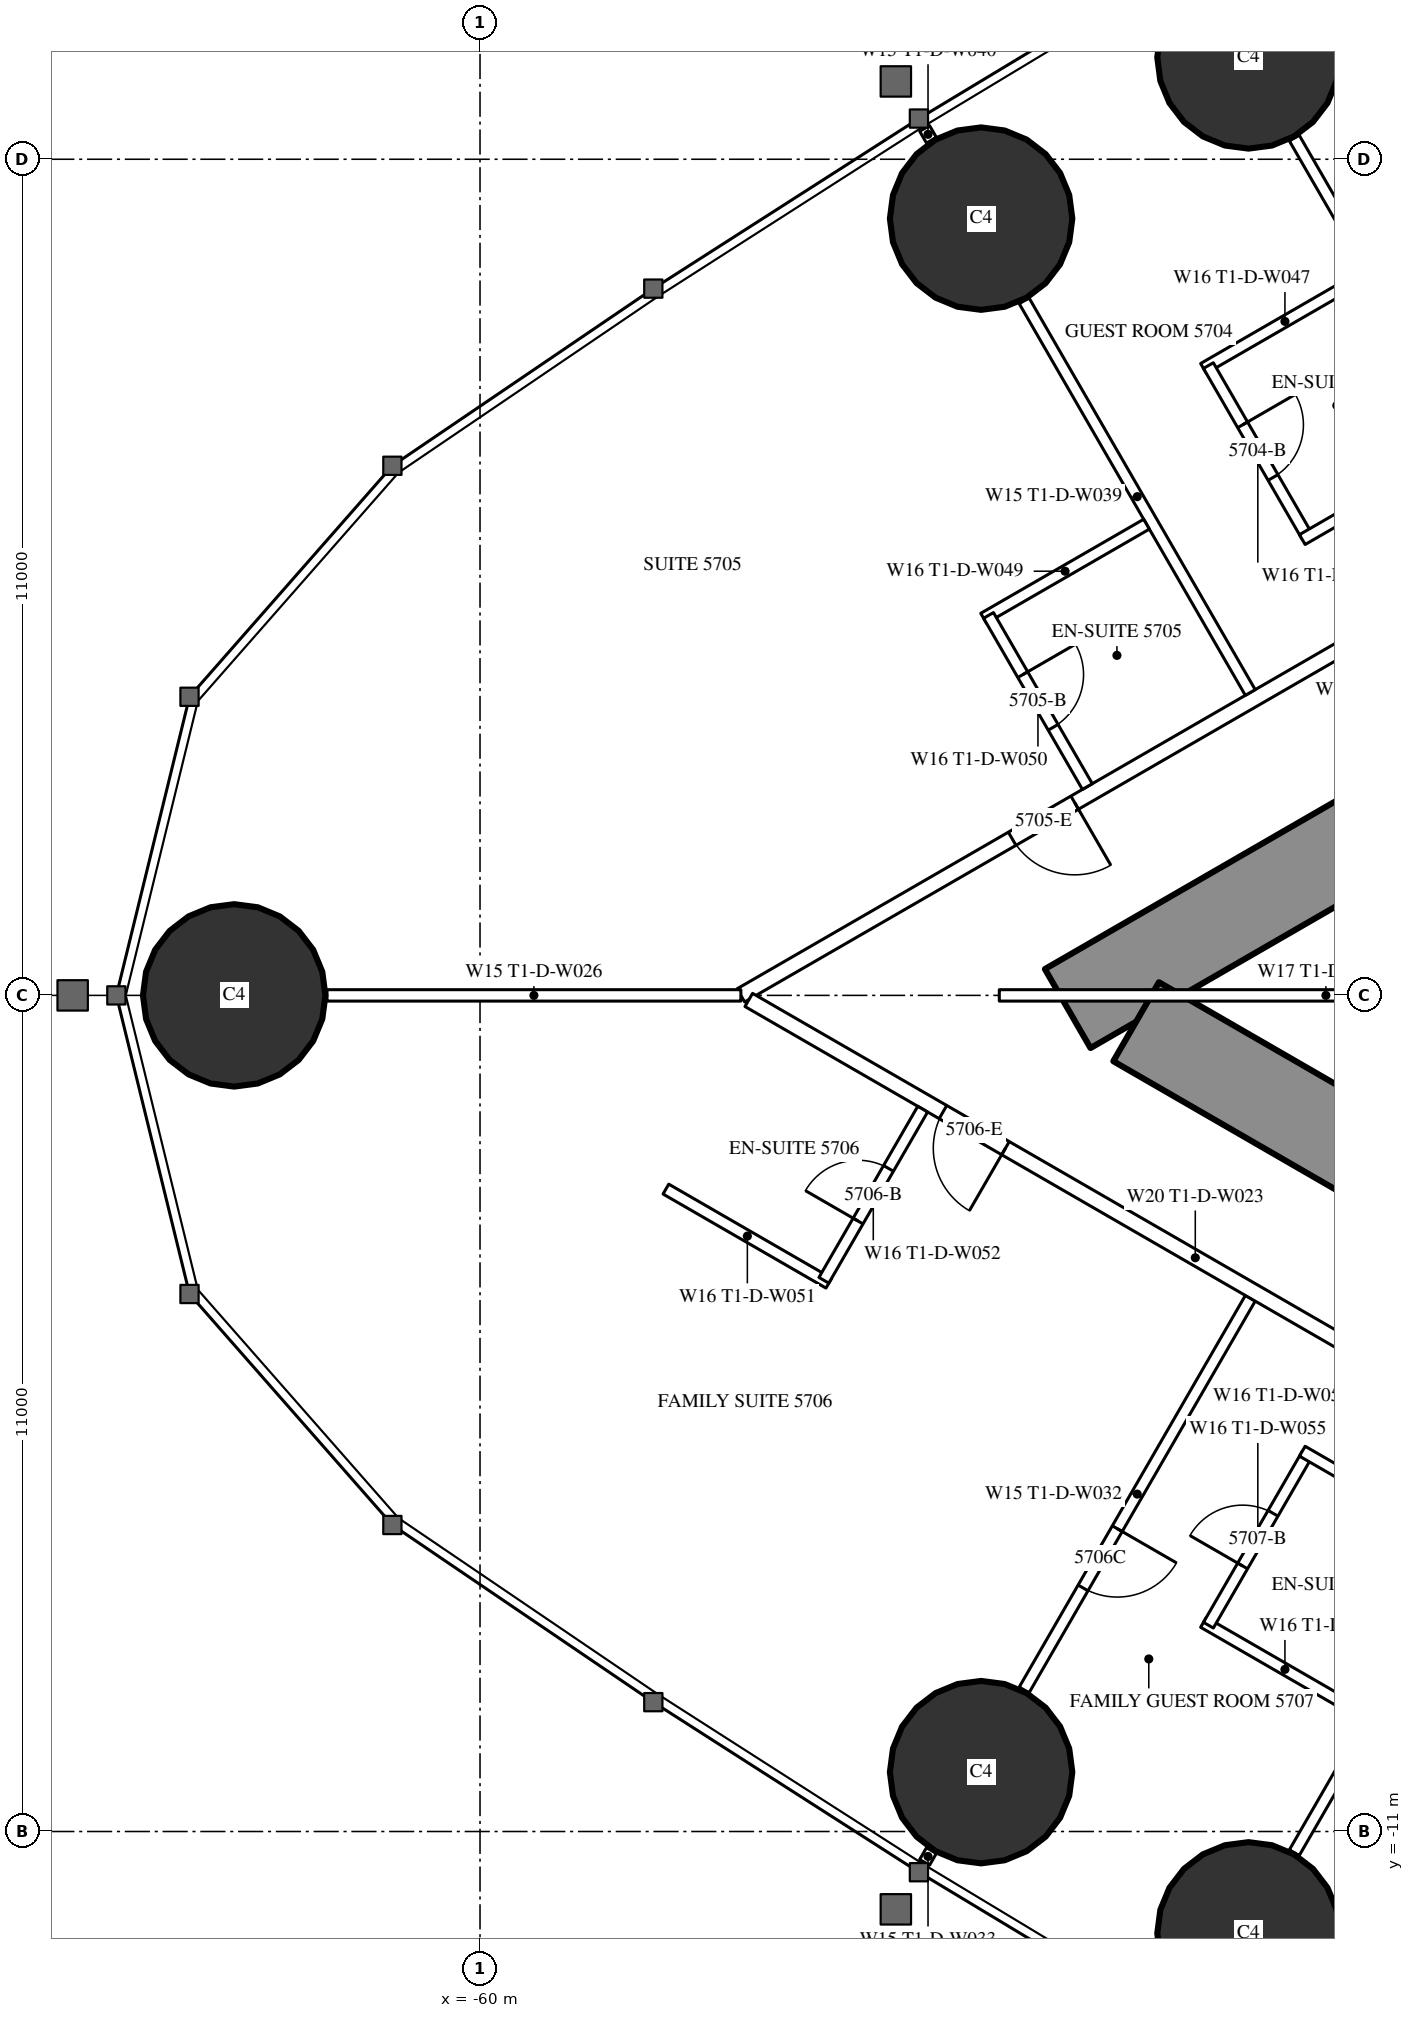
"""IFC4 building model, lengths in metres.
Left out: names, types, materials, properties, quantities, classifications, styles, units other than length and angle.
Written with IfcOpenShell. Run it as: python <this file> out.ifc"""

import sys

from ifc_helpers import new_model, si_unit, direction, frame, frame_2d, origin, origin_2d, place, context, subcontext, project, spatial, rectangle, circle, extrude, element, fill, save


model = new_model("IFC4")
c1 = context("Model", 3, precision=1e-05, world=origin(), true_north=direction((0.0, 1.0)))
c2 = subcontext(c1, "Body", "Model", "MODEL_VIEW")
j1 = project(units=[si_unit("LENGTHUNIT", "METRE"), si_unit("PLANEANGLEUNIT", "RADIAN")], contexts=[c1])
p1 = place(None, origin())
s1 = spatial("IfcSite", under=j1, at=p1, CompositionType="ELEMENT")
p2 = place(p1, origin())
s2 = spatial("IfcBuilding", under=s1, at=p2, CompositionType="ELEMENT")
p3 = place(p2, frame((0.0, 0.0, 215.3)))
s3 = spatial("IfcBuildingStorey", under=s2, at=p3, CompositionType="ELEMENT", Elevation=215.3)
for number, where, z_axis, x_axis in (
    (1, (-63.234, 0.0, 0.0), (0.0, 0.0, 1.0), (1.0, 0.0, 0.0)),
    (2, (-53.408, -10.219, 0.0), (0.0, 0.0, 1.0), (1.0, 0.0, 0.0)),
    (3, (-49.89, -12.34, 0.0), (0.0, 0.0, 1.0), (1.0, 0.0, 0.0)),
    (4, (-49.89, 12.34, 0.0), (0.0, 0.0, 1.0), (1.0, 0.0, 0.0)),
    (5, (-53.408, 10.219, 0.0), (0.0, 0.0, 1.0), (1.0, 0.0, 0.0)),
):
    element("IfcColumn", number, at=place(p3, frame(where, z_axis=z_axis, x_axis=x_axis)), inside=s3, PredefinedType="COLUMN", context=c2, shape_type="SweptSolid", body=[
        extrude(circle(Radius=1.2, at=origin_2d()), origin(), (0.0, 0.0, 1.0), 3.6),
    ])
p4 = place(p3, frame((-27.2, 14.3, 0.0), z_axis=(0.0, 0.0, 1.0), x_axis=(-0.866026593062, -0.499997940104, 0.0)))
e6 = element("IfcWall", 6, at=p4, inside=s3, PredefinedType="SHEAR", context=c2, shape_type="SweptSolid", body=[
    extrude(rectangle(XDim=28.946, YDim=1.2, at=frame_2d((14.473, 0.0))), origin(), (0.0, 0.0, 1.0), 3.6),
])
p5 = place(p4, frame((4.6, 0.0, 0.0)))
e7 = element("IfcOpeningElement", 7, at=p5, cuts=e6, PredefinedType="OPENING", context=c2, shape_type="SweptSolid", body=[
    extrude(rectangle(XDim=1.0, YDim=2.2, at=frame_2d((0.5, 1.1))), frame((0.0, 0.61, 0.0), z_axis=(0.0, -1.0, 0.0), x_axis=(1.0, 0.0, 0.0)), (0.0, 0.0, 1.0), 1.22),
])
p6 = place(p4, frame((13.395, 0.0, 0.0)))
e8 = element("IfcOpeningElement", 8, at=p6, cuts=e6, PredefinedType="OPENING", context=c2, shape_type="SweptSolid", body=[
    extrude(rectangle(XDim=1.8, YDim=2.2, at=frame_2d((0.9, 1.1))), frame((0.0, 0.61, 0.0), z_axis=(0.0, -1.0, 0.0), x_axis=(1.0, 0.0, 0.0)), (0.0, 0.0, 1.0), 1.22),
])
p7 = place(p3, frame((-27.2, -14.3, 0.0), z_axis=(0.0, 0.0, 1.0), x_axis=(-0.866024021859, 0.500002393557, 0.0)))
e9 = element("IfcWall", 9, at=p7, inside=s3, PredefinedType="SHEAR", context=c2, shape_type="SweptSolid", body=[
    extrude(rectangle(XDim=27.907, YDim=1.2, at=frame_2d((13.954, 0.0))), origin(), (0.0, 0.0, 1.0), 3.6),
])
p8 = place(p7, frame((4.6, 0.0, 0.0)))
e10 = element("IfcOpeningElement", 10, at=p8, cuts=e9, PredefinedType="OPENING", context=c2, shape_type="SweptSolid", body=[
    extrude(rectangle(XDim=1.0, YDim=2.2, at=frame_2d((0.5, 1.1))), frame((0.0, 0.61, 0.0), z_axis=(0.0, -1.0, 0.0), x_axis=(1.0, 0.0, 0.0)), (0.0, 0.0, 1.0), 1.22),
])
p9 = place(p7, frame((13.395, 0.0, 0.0)))
e11 = element("IfcOpeningElement", 11, at=p9, cuts=e9, PredefinedType="OPENING", context=c2, shape_type="SweptSolid", body=[
    extrude(rectangle(XDim=1.8, YDim=2.2, at=frame_2d((0.9, 1.1))), frame((0.0, 0.61, 0.0), z_axis=(0.0, -1.0, 0.0), x_axis=(1.0, 0.0, 0.0)), (0.0, 0.0, 1.0), 1.22),
])
p10 = place(p3, frame((-28.737, 16.068, 0.0), z_axis=(0.0, 0.0, 1.0), x_axis=(-0.866026057212, -0.499998868229, 0.0)))
e12 = element("IfcWall", 12, at=p10, inside=s3, PredefinedType="PARTITIONING", context=c2, shape_type="SweptSolid", body=[
    extrude(rectangle(XDim=32.137, YDim=0.2, at=frame_2d((16.068, 0.0))), origin(), (0.0, 0.0, 1.0), 3.35),
])
p11 = place(p10, frame((1.08, 0.0, 0.0)))
e13 = element("IfcOpeningElement", 13, at=p11, cuts=e12, PredefinedType="OPENING", context=c2, shape_type="SweptSolid", body=[
    extrude(rectangle(XDim=1.8, YDim=2.03, at=frame_2d((0.9, 1.015))), frame((0.0, 0.11, 0.0), z_axis=(0.0, -1.0, 0.0), x_axis=(1.0, 0.0, 0.0)), (0.0, 0.0, 1.0), 0.22),
])
p12 = place(p10, frame((6.86, 0.0, 0.0)))
e14 = element("IfcOpeningElement", 14, at=p12, cuts=e12, PredefinedType="OPENING", context=c2, shape_type="SweptSolid", body=[
    extrude(rectangle(XDim=1.0, YDim=2.2, at=frame_2d((0.5, 1.1))), frame((0.0, 0.11, 0.0), z_axis=(0.0, -1.0, 0.0), x_axis=(1.0, 0.0, 0.0)), (0.0, 0.0, 1.0), 0.22),
])
p13 = place(p10, frame((16.418, 0.0, 0.0)))
e15 = element("IfcOpeningElement", 15, at=p13, cuts=e12, PredefinedType="OPENING", context=c2, shape_type="SweptSolid", body=[
    extrude(rectangle(XDim=0.95, YDim=2.2, at=frame_2d((0.475, 1.1))), frame((0.0, 0.11, 0.0), z_axis=(0.0, -1.0, 0.0), x_axis=(1.0, 0.0, 0.0)), (0.0, 0.0, 1.0), 0.22),
])
p14 = place(p10, frame((20.567, 0.0, 0.0)))
e16 = element("IfcOpeningElement", 16, at=p14, cuts=e12, PredefinedType="OPENING", context=c2, shape_type="SweptSolid", body=[
    extrude(rectangle(XDim=0.95, YDim=2.2, at=frame_2d((0.475, 1.1))), frame((0.0, 0.11, 0.0), z_axis=(0.0, -1.0, 0.0), x_axis=(1.0, 0.0, 0.0)), (0.0, 0.0, 1.0), 0.22),
])
p15 = place(p10, frame((27.065, 0.0, 0.0)))
e17 = element("IfcOpeningElement", 17, at=p15, cuts=e12, PredefinedType="OPENING", context=c2, shape_type="SweptSolid", body=[
    extrude(rectangle(XDim=0.95, YDim=2.2, at=frame_2d((0.475, 1.1))), frame((0.0, 0.11, 0.0), z_axis=(0.0, -1.0, 0.0), x_axis=(1.0, 0.0, 0.0)), (0.0, 0.0, 1.0), 0.22),
])
p16 = place(p3, frame((-46.274, 6.059, 0.0), z_axis=(0.0, 0.0, 1.0), x_axis=(-0.500020471368, 0.866013584312, 0.0)))
e18 = element("IfcWall", 18, at=p16, inside=s3, PredefinedType="PARTITIONING", context=c2, shape_type="SweptSolid", body=[
    extrude(rectangle(XDim=6.028, YDim=0.15, at=frame_2d((3.014, 0.0))), origin(), (0.0, 0.0, 1.0), 2.45),
])
p17 = place(p3, frame((-49.866, 3.985, 0.0), z_axis=(0.0, 0.0, 1.0), x_axis=(-0.500000694566, 0.866025002776, 0.0)))
e19 = element("IfcWall", 19, at=p17, inside=s3, PredefinedType="PARTITIONING", context=c2, shape_type="SweptSolid", body=[
    extrude(rectangle(XDim=5.95, YDim=0.15, at=frame_2d((2.975, 0.0))), origin(), (0.0, 0.0, 1.0), 2.45),
])
p18 = place(p3, frame((-54.061, 11.25, 0.0), z_axis=(0.0, 0.0, 1.0), x_axis=(-0.500391173478, 0.865799441849, 0.0)))
e20 = element("IfcWall", 20, at=p18, inside=s3, PredefinedType="PARTITIONING", context=c2, shape_type="SweptSolid", body=[
    extrude(rectangle(XDim=0.179, YDim=0.15, at=frame_2d((0.089, 0.0))), origin(), (0.0, 0.0, 1.0), 2.45),
])
p19 = place(p3, frame((-46.274, -6.059, 0.0), z_axis=(0.0, 0.0, 1.0), x_axis=(-0.500020471368, -0.866013584312, 0.0)))
e21 = element("IfcWall", 21, at=p19, inside=s3, PredefinedType="PARTITIONING", context=c2, shape_type="SweptSolid", body=[
    extrude(rectangle(XDim=6.028, YDim=0.15, at=frame_2d((3.014, 0.0))), origin(), (0.0, 0.0, 1.0), 2.45),
])
p20 = place(p3, frame((-49.866, -3.985, 0.0), z_axis=(0.0, 0.0, 1.0), x_axis=(-0.500000694566, -0.866025002776, 0.0)))
e22 = element("IfcWall", 22, at=p20, inside=s3, PredefinedType="PARTITIONING", context=c2, shape_type="SweptSolid", body=[
    extrude(rectangle(XDim=5.95, YDim=0.15, at=frame_2d((2.975, 0.0))), origin(), (0.0, 0.0, 1.0), 2.45),
])
p21 = place(p20, frame((3.5, 0.0, 0.0)))
e23 = element("IfcOpeningElement", 23, at=p21, cuts=e22, PredefinedType="OPENING", context=c2, shape_type="SweptSolid", body=[
    extrude(rectangle(XDim=0.9, YDim=2.2, at=frame_2d((0.45, 1.1))), frame((0.0, 0.085, 0.0), z_axis=(0.0, -1.0, 0.0), x_axis=(1.0, 0.0, 0.0)), (0.0, 0.0, 1.0), 0.17),
])
p22 = place(p3, frame((-54.061, -11.25, 0.0), z_axis=(0.0, 0.0, 1.0), x_axis=(-0.500391173478, -0.865799441849, 0.0)))
e24 = element("IfcWall", 24, at=p22, inside=s3, PredefinedType="PARTITIONING", context=c2, shape_type="SweptSolid", body=[
    extrude(rectangle(XDim=0.179, YDim=0.15, at=frame_2d((0.089, 0.0))), origin(), (0.0, 0.0, 1.0), 2.45),
])
p23 = place(p3, frame((-56.568, 0.0, 0.0), z_axis=(0.0, 0.0, 1.0), x_axis=(-1.0, 0.0, 0.0)))
e25 = element("IfcWall", 25, at=p23, inside=s3, PredefinedType="PARTITIONING", context=c2, shape_type="SweptSolid", body=[
    extrude(rectangle(XDim=5.446, YDim=0.15, at=frame_2d((2.723, 0.0))), origin(), (0.0, 0.0, 1.0), 2.45),
])
p24 = place(p3, frame((-44.715, -6.844, 0.0), z_axis=(0.0, 0.0, 1.0), x_axis=(-0.866025261224, 0.500000246922, 0.0)))
e26 = element("IfcWall", 26, at=p24, inside=s3, PredefinedType="PARTITIONING", context=c2, shape_type="SweptSolid", body=[
    extrude(rectangle(XDim=13.567, YDim=0.2, at=frame_2d((6.783, 0.0))), origin(), (0.0, 0.0, 1.0), 3.35),
])
p25 = place(p24, frame((9.667, 0.0, 0.0)))
e27 = element("IfcOpeningElement", 27, at=p25, cuts=e26, PredefinedType="OPENING", context=c2, shape_type="SweptSolid", body=[
    extrude(rectangle(XDim=0.95, YDim=2.2, at=frame_2d((0.475, 1.1))), frame((0.0, 0.11, 0.0), z_axis=(0.0, -1.0, 0.0), x_axis=(1.0, 0.0, 0.0)), (0.0, 0.0, 1.0), 0.22),
])
p26 = place(p24, frame((2.117, 0.0, 0.0)))
e28 = element("IfcOpeningElement", 28, at=p26, cuts=e26, PredefinedType="OPENING", context=c2, shape_type="SweptSolid", body=[
    extrude(rectangle(XDim=0.95, YDim=2.2, at=frame_2d((0.475, 1.1))), frame((0.0, 0.11, 0.0), z_axis=(0.0, -1.0, 0.0), x_axis=(1.0, 0.0, 0.0)), (0.0, 0.0, 1.0), 0.22),
])
p27 = place(p24, frame((0.5, 0.0, 0.0)))
e29 = element("IfcOpeningElement", 29, at=p27, cuts=e26, PredefinedType="OPENING", context=c2, shape_type="SweptSolid", body=[
    extrude(rectangle(XDim=0.967, YDim=2.2, at=frame_2d((0.483, 1.1))), frame((0.0, 0.11, 0.0), z_axis=(0.0, -1.0, 0.0), x_axis=(1.0, 0.0, 0.0)), (0.0, 0.0, 1.0), 0.22),
])
p28 = place(p3, frame((-48.339, 9.486, 0.0), z_axis=(0.0, 0.0, 1.0), x_axis=(-0.866006523861, -0.500032699561, 0.0)))
e30 = element("IfcWall", 30, at=p28, inside=s3, PredefinedType="PARTITIONING", context=c2, shape_type="SweptSolid", body=[
    extrude(rectangle(XDim=2.475, YDim=0.15, at=frame_2d((1.237, 0.0))), origin(), (0.0, 0.0, 1.0), 3.35),
])
p29 = place(p3, frame((-49.117, 6.034, 0.0), z_axis=(0.0, 0.0, 1.0), x_axis=(-0.500006934395, 0.866021400173, 0.0)))
e31 = element("IfcWall", 31, at=p29, inside=s3, PredefinedType="PARTITIONING", context=c2, shape_type="SweptSolid", body=[
    extrude(rectangle(XDim=2.6, YDim=0.15, at=frame_2d((1.3, 0.0))), origin(), (0.0, 0.0, 1.0), 3.35),
])
p30 = place(p29, frame((0.9, 0.0, 0.0)))
e32 = element("IfcOpeningElement", 32, at=p30, cuts=e31, PredefinedType="OPENING", context=c2, shape_type="SweptSolid", body=[
    extrude(rectangle(XDim=0.8, YDim=2.2, at=frame_2d((0.4, 1.1))), frame((0.0, 0.085, 0.0), z_axis=(0.0, -1.0, 0.0), x_axis=(1.0, 0.0, 0.0)), (0.0, 0.0, 1.0), 0.17),
])
for number, where, z_axis, x_axis in (
    (33, (-47.039, 7.234, 0.0), (0.0, 0.0, 1.0), (-0.866, -0.5, 0.0)),
    (34, (-51.231, 6.199, 0.0), (0.0, 0.0, 1.0), (-0.866, -0.5, 0.0)),
):
    element("IfcWall", number, at=place(p3, frame(where, z_axis=z_axis, x_axis=x_axis)), inside=s3, PredefinedType="PARTITIONING", context=c2, shape_type="SweptSolid", body=[
        extrude(rectangle(XDim=2.475, YDim=0.15, at=frame_2d((1.238, 0.0))), origin(), (0.0, 0.0, 1.0), 3.35),
    ])
p31 = place(p3, frame((-52.01, 2.747, 0.0), z_axis=(0.0, 0.0, 1.0), x_axis=(-0.500006934395, 0.866021400173, 0.0)))
e35 = element("IfcWall", 35, at=p31, inside=s3, PredefinedType="PARTITIONING", context=c2, shape_type="SweptSolid", body=[
    extrude(rectangle(XDim=2.6, YDim=0.15, at=frame_2d((1.3, 0.0))), origin(), (0.0, 0.0, 1.0), 3.35),
])
p32 = place(p31, frame((0.9, 0.0, 0.0)))
e36 = element("IfcOpeningElement", 36, at=p32, cuts=e35, PredefinedType="OPENING", context=c2, shape_type="SweptSolid", body=[
    extrude(rectangle(XDim=0.8, YDim=2.2, at=frame_2d((0.4, 1.1))), frame((0.0, 0.085, 0.0), z_axis=(0.0, -1.0, 0.0), x_axis=(1.0, 0.0, 0.0)), (0.0, 0.0, 1.0), 0.17),
])
p33 = place(p3, frame((-55.411, -3.786, 0.0), z_axis=(0.0, 0.0, 1.0), x_axis=(-0.866006523861, 0.500032699561, 0.0)))
e37 = element("IfcWall", 37, at=p33, inside=s3, PredefinedType="PARTITIONING", context=c2, shape_type="SweptSolid", body=[
    extrude(rectangle(XDim=2.475, YDim=0.15, at=frame_2d((1.237, 0.0))), origin(), (0.0, 0.0, 1.0), 3.35),
])
p34 = place(p3, frame((-54.176, -1.497, 0.0), z_axis=(0.0, 0.0, 1.0), x_axis=(-0.500006934395, -0.866021400173, 0.0)))
e38 = element("IfcWall", 38, at=p34, inside=s3, PredefinedType="PARTITIONING", context=c2, shape_type="SweptSolid", body=[
    extrude(rectangle(XDim=2.6, YDim=0.15, at=frame_2d((1.3, 0.0))), origin(), (0.0, 0.0, 1.0), 3.35),
])
p35 = place(p34, frame((0.9, 0.0, 0.0)))
e39 = element("IfcOpeningElement", 39, at=p35, cuts=e38, PredefinedType="OPENING", context=c2, shape_type="SweptSolid", body=[
    extrude(rectangle(XDim=0.8, YDim=2.2, at=frame_2d((0.4, 1.1))), frame((0.0, 0.085, 0.0), z_axis=(0.0, -1.0, 0.0), x_axis=(1.0, 0.0, 0.0)), (0.0, 0.0, 1.0), 0.17),
])
p36 = place(p3, frame((-48.339, -9.486, 0.0), z_axis=(0.0, 0.0, 1.0), x_axis=(-0.866006523861, 0.500032699561, 0.0)))
e40 = element("IfcWall", 40, at=p36, inside=s3, PredefinedType="PARTITIONING", context=c2, shape_type="SweptSolid", body=[
    extrude(rectangle(XDim=2.475, YDim=0.15, at=frame_2d((1.237, 0.0))), origin(), (0.0, 0.0, 1.0), 3.35),
])
p37 = place(p3, frame((-49.117, -6.034, 0.0), z_axis=(0.0, 0.0, 1.0), x_axis=(-0.500006934395, -0.866021400173, 0.0)))
e41 = element("IfcWall", 41, at=p37, inside=s3, PredefinedType="PARTITIONING", context=c2, shape_type="SweptSolid", body=[
    extrude(rectangle(XDim=2.6, YDim=0.15, at=frame_2d((1.3, 0.0))), origin(), (0.0, 0.0, 1.0), 3.35),
])
p38 = place(p37, frame((0.9, 0.0, 0.0)))
e42 = element("IfcOpeningElement", 42, at=p38, cuts=e41, PredefinedType="OPENING", context=c2, shape_type="SweptSolid", body=[
    extrude(rectangle(XDim=0.8, YDim=2.2, at=frame_2d((0.4, 1.1))), frame((0.0, 0.085, 0.0), z_axis=(0.0, -1.0, 0.0), x_axis=(1.0, 0.0, 0.0)), (0.0, 0.0, 1.0), 0.17),
])
p39 = place(p3, frame((-47.039, -7.234, 0.0), z_axis=(0.0, 0.0, 1.0), x_axis=(-0.866073894602, 0.499916002032, 0.0)))
e43 = element("IfcWall", 43, at=p39, inside=s3, PredefinedType="PARTITIONING", context=c2, shape_type="SweptSolid", body=[
    extrude(rectangle(XDim=2.475, YDim=0.15, at=frame_2d((1.238, 0.0))), origin(), (0.0, 0.0, 1.0), 2.5),
])
p40 = place(p3, frame((-44.575, 0.0, 0.0), z_axis=(0.0, 0.0, 1.0), x_axis=(-1.0, 0.0, 0.0)))
e44 = element("IfcWall", 44, at=p40, inside=s3, PredefinedType="PARTITIONING", context=c2, shape_type="SweptSolid", body=[
    extrude(rectangle(XDim=8.593, YDim=0.15, at=frame_2d((4.297, 0.0))), origin(), (0.0, 0.0, 1.0), 2.45),
])
p41 = place(p30, origin())
e45 = element("IfcDoor", 45, at=p41, inside=s3, OperationType="SINGLE_SWING_RIGHT", PredefinedType="DOOR", context=c2, shape_type="SweptSolid", body=[
    extrude(rectangle(XDim=0.8, YDim=2.2, at=frame_2d((0.4, 1.1))), frame((0.0, 0.025, 0.0), z_axis=(0.0, -1.0, 0.0), x_axis=(1.0, 0.0, 0.0)), (0.0, 0.0, 1.0), 0.05),
])
fill(e32, e45)
p42 = place(p32, origin())
e46 = element("IfcDoor", 46, at=p42, inside=s3, OperationType="SINGLE_SWING_RIGHT", PredefinedType="DOOR", context=c2, shape_type="SweptSolid", body=[
    extrude(rectangle(XDim=0.8, YDim=2.2, at=frame_2d((0.4, 1.1))), frame((0.0, 0.025, 0.0), z_axis=(0.0, -1.0, 0.0), x_axis=(1.0, 0.0, 0.0)), (0.0, 0.0, 1.0), 0.05),
])
fill(e36, e46)
p43 = place(p15, origin())
e47 = element("IfcDoor", 47, at=p43, inside=s3, OperationType="SINGLE_SWING_LEFT", PredefinedType="DOOR", context=c2, shape_type="SweptSolid", body=[
    extrude(rectangle(XDim=0.95, YDim=2.2, at=frame_2d((0.475, 1.1))), frame((0.0, 0.025, 0.0), z_axis=(0.0, -1.0, 0.0), x_axis=(1.0, 0.0, 0.0)), (0.0, 0.0, 1.0), 0.05),
])
fill(e17, e47)
p44 = place(p35, origin())
e48 = element("IfcDoor", 48, at=p44, inside=s3, OperationType="SINGLE_SWING_RIGHT", PredefinedType="DOOR", context=c2, shape_type="SweptSolid", body=[
    extrude(rectangle(XDim=0.8, YDim=2.2, at=frame_2d((0.4, 1.1))), frame((0.0, 0.025, 0.0), z_axis=(0.0, -1.0, 0.0), x_axis=(1.0, 0.0, 0.0)), (0.0, 0.0, 1.0), 0.05),
])
fill(e39, e48)
p45 = place(p25, origin())
e49 = element("IfcDoor", 49, at=p45, inside=s3, OperationType="SINGLE_SWING_LEFT", PredefinedType="DOOR", context=c2, shape_type="SweptSolid", body=[
    extrude(rectangle(XDim=0.95, YDim=2.2, at=frame_2d((0.475, 1.1))), frame((0.0, 0.025, 0.0), z_axis=(0.0, -1.0, 0.0), x_axis=(1.0, 0.0, 0.0)), (0.0, 0.0, 1.0), 0.05),
])
fill(e27, e49)
p46 = place(p38, origin())
e50 = element("IfcDoor", 50, at=p46, inside=s3, OperationType="SINGLE_SWING_RIGHT", PredefinedType="DOOR", context=c2, shape_type="SweptSolid", body=[
    extrude(rectangle(XDim=0.8, YDim=2.2, at=frame_2d((0.4, 1.1))), frame((0.0, 0.025, 0.0), z_axis=(0.0, -1.0, 0.0), x_axis=(1.0, 0.0, 0.0)), (0.0, 0.0, 1.0), 0.05),
])
fill(e42, e50)
p47 = place(p21, origin())
e51 = element("IfcDoor", 51, at=p47, inside=s3, OperationType="SINGLE_SWING_LEFT", PredefinedType="DOOR", context=c2, shape_type="SweptSolid", body=[
    extrude(rectangle(XDim=0.9, YDim=2.2, at=frame_2d((0.45, 1.1))), frame((0.0, 0.025, 0.0), z_axis=(0.0, -1.0, 0.0), x_axis=(1.0, 0.0, 0.0)), (0.0, 0.0, 1.0), 0.05),
])
fill(e23, e51)
save(model, sys.argv[1])
